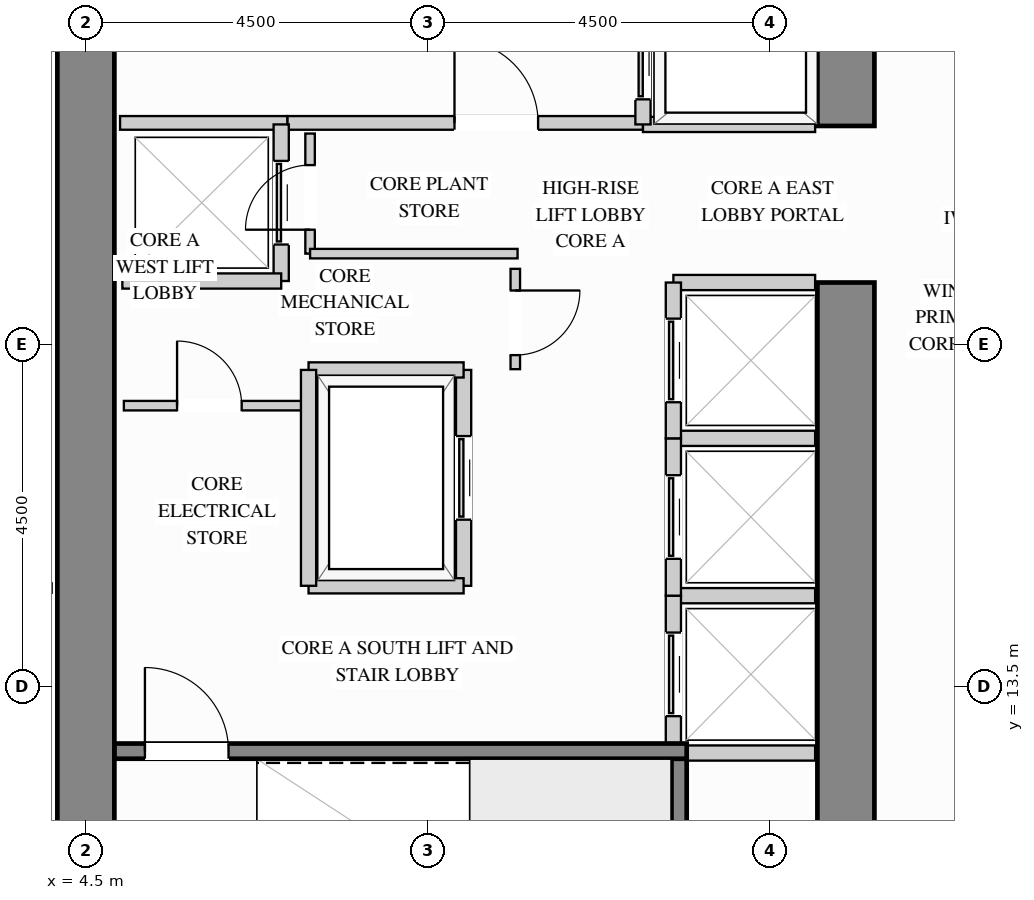
"""IFC4 building model, lengths in metres.
Left out: names, types, materials, properties, quantities, classifications, styles, units other than length and angle.
Written with IfcOpenShell. Run it as: python <this file> out.ifc"""

import sys

from ifc_helpers import new_model, si_unit, direction, frame, frame_2d, origin, place, context, subcontext, project, spatial, rectangle, extrude, source, transform, mapped, element, fill, save


model = new_model("IFC4")
c1 = context("Model", 3, precision=1e-05, world=origin(), true_north=direction((0.0, 1.0)))
c2 = subcontext(c1, "Body", "Model", "MODEL_VIEW")
j1 = project(units=[si_unit("LENGTHUNIT", "METRE"), si_unit("PLANEANGLEUNIT", "RADIAN")], contexts=[c1])
p1 = place(None, origin())
s1 = spatial("IfcSite", under=j1, at=p1, CompositionType="ELEMENT")
p2 = place(p1, origin())
s2 = spatial("IfcBuilding", under=s1, at=p2, CompositionType="ELEMENT")
p3 = place(p2, frame((0.0, 0.0, 120.6)))
s3 = spatial("IfcBuildingStorey", under=s2, at=p3, CompositionType="ELEMENT", Elevation=120.6)
m1 = source(origin(), c2, "Body", "SweptSolid", [
    extrude(rectangle(XDim=9.945, YDim=0.75, at=frame_2d((4.973, 0.0))), origin(), (0.0, 0.0, 1.0), 3.38),
])
p4 = place(p3, frame((14.5, 8.875, 0.0), z_axis=(0.0, 0.0, 1.0), x_axis=(0.0, 1.0, 0.0)))
e1 = element("IfcWall", 1, at=p4, inside=s3, PredefinedType="SHEAR", context=c2, shape_type="MappedRepresentation", body=[
    mapped(m1, transform((0.0, 0.0, 0.0), x_axis=(1.0, 0.0, 0.0), y_axis=(0.0, 1.0, 0.0), z_axis=(0.0, 0.0, 1.0))),
])
m2 = source(origin(), c2, "Body", "SweptSolid", [
    extrude(rectangle(XDim=8.245, YDim=0.75, at=frame_2d((4.123, 0.0))), origin(), (0.0, 0.0, 1.0), 3.38),
])
p5 = place(p3, frame((14.5, 20.88, 0.0), z_axis=(0.0, 0.0, 1.0), x_axis=(0.0, 1.0, 0.0)))
e2 = element("IfcWall", 2, at=p5, inside=s3, PredefinedType="SHEAR", context=c2, shape_type="MappedRepresentation", body=[
    mapped(m2, transform((0.0, 0.0, 0.0), x_axis=(1.0, 0.0, 0.0), y_axis=(0.0, 1.0, 0.0), z_axis=(0.0, 0.0, 1.0))),
])
m3 = source(origin(), c2, "Body", "SweptSolid", [
    extrude(rectangle(XDim=20.25, YDim=0.75, at=frame_2d((10.125, 0.0))), origin(), (0.0, 0.0, 1.0), 3.38),
])
p6 = place(p3, frame((4.5, 8.875, 0.0), z_axis=(0.0, 0.0, 1.0), x_axis=(0.0, 1.0, 0.0)))
e3 = element("IfcWall", 3, at=p6, inside=s3, PredefinedType="SHEAR", context=c2, shape_type="MappedRepresentation", body=[
    mapped(m3, transform((0.0, 0.0, 0.0), x_axis=(1.0, 0.0, 0.0), y_axis=(0.0, 1.0, 0.0), z_axis=(0.0, 0.0, 1.0))),
])
p7 = place(p3, frame((7.15, 20.92, 0.0), z_axis=(0.0, 0.0, 1.0), x_axis=(1.0, 0.0, 0.0)))
e4 = element("IfcWall", 4, at=p7, inside=s3, PredefinedType="PARTITIONING", context=c2, shape_type="SweptSolid", body=[
    extrude(rectangle(XDim=4.68, YDim=0.18, at=frame_2d((2.34, 0.0))), origin(), (0.0, 0.0, 1.0), 3.365),
])
p8 = place(p7, frame((2.2, 0.0, 0.0)))
e5 = element("IfcOpeningElement", 5, at=p8, cuts=e4, PredefinedType="OPENING", context=c2, shape_type="SweptSolid", body=[
    extrude(rectangle(XDim=1.1, YDim=2.15, at=frame_2d((0.55, 1.075))), frame((0.0, 0.1, 0.0), z_axis=(0.0, -1.0, 0.0), x_axis=(1.0, 0.0, 0.0)), (0.0, 0.0, 1.0), 0.2),
])
m4 = source(origin(), c2, "Body", "SweptSolid", [
    extrude(rectangle(XDim=2.2, YDim=0.18, at=frame_2d((1.1, 0.0))), origin(), (0.0, 0.0, 1.0), 3.365),
])
p9 = place(p3, frame((4.95, 20.92, 0.0), z_axis=(0.0, 0.0, 1.0), x_axis=(1.0, 0.0, 0.0)))
e6 = element("IfcWall", 6, at=p9, inside=s3, PredefinedType="PARTITIONING", context=c2, shape_type="MappedRepresentation", body=[
    mapped(m4, transform((0.0, 0.0, 0.0), x_axis=(1.0, 0.0, 0.0), y_axis=(0.0, 1.0, 0.0), z_axis=(0.0, 0.0, 1.0))),
])
p10 = place(p3, frame((10.15, 17.68, 0.0), z_axis=(0.0, 0.0, 1.0), x_axis=(0.0, 1.0, 0.0)))
e7 = element("IfcWall", 7, at=p10, inside=s3, PredefinedType="PARTITIONING", context=c2, shape_type="SweptSolid", body=[
    extrude(rectangle(XDim=1.32, YDim=0.125, at=frame_2d((0.66, 0.0))), origin(), (0.0, 0.0, 1.0), 3.365),
])
p11 = place(p10, frame((0.185, 0.0, 0.0)))
e8 = element("IfcOpeningElement", 8, at=p11, cuts=e7, PredefinedType="OPENING", context=c2, shape_type="SweptSolid", body=[
    extrude(rectangle(XDim=0.85, YDim=2.1, at=frame_2d((0.425, 1.05))), frame((0.0, 0.073, 0.0), z_axis=(0.0, -1.0, 0.0), x_axis=(1.0, 0.0, 0.0)), (0.0, 0.0, 1.0), 0.145),
])
p12 = place(p3, frame((7.45, 19.2, 0.0), z_axis=(0.0, 0.0, 1.0), x_axis=(0.0, 1.0, 0.0)))
e9 = element("IfcWall", 9, at=p12, inside=s3, PredefinedType="PARTITIONING", context=c2, shape_type="SweptSolid", body=[
    extrude(rectangle(XDim=1.58, YDim=0.125, at=frame_2d((0.79, 0.0))), origin(), (0.0, 0.0, 1.0), 3.365),
])
p13 = place(p12, frame((0.315, 0.0, 0.0)))
e10 = element("IfcOpeningElement", 10, at=p13, cuts=e9, PredefinedType="OPENING", context=c2, shape_type="SweptSolid", body=[
    extrude(rectangle(XDim=0.85, YDim=2.1, at=frame_2d((0.425, 1.05))), frame((0.0, 0.073, 0.0), z_axis=(0.0, -1.0, 0.0), x_axis=(1.0, 0.0, 0.0)), (0.0, 0.0, 1.0), 0.145),
])
m5 = source(origin(), c2, "Body", "SweptSolid", [
    extrude(rectangle(XDim=2.73, YDim=0.125, at=frame_2d((1.365, 0.0))), origin(), (0.0, 0.0, 1.0), 3.365),
])
p14 = place(p3, frame((7.45, 19.2, 0.0), z_axis=(0.0, 0.0, 1.0), x_axis=(1.0, 0.0, 0.0)))
e11 = element("IfcWall", 11, at=p14, inside=s3, PredefinedType="PARTITIONING", context=c2, shape_type="MappedRepresentation", body=[
    mapped(m5, transform((0.0, 0.0, 0.0), x_axis=(1.0, 0.0, 0.0), y_axis=(0.0, 1.0, 0.0), z_axis=(0.0, 0.0, 1.0))),
])
p15 = place(p3, frame((5.0, 17.2, 0.0), z_axis=(0.0, 0.0, 1.0), x_axis=(1.0, 0.0, 0.0)))
e12 = element("IfcWall", 12, at=p15, inside=s3, PredefinedType="PARTITIONING", context=c2, shape_type="SweptSolid", body=[
    extrude(rectangle(XDim=2.4, YDim=0.125, at=frame_2d((1.2, 0.0))), origin(), (0.0, 0.0, 1.0), 3.365),
])
p16 = place(p15, frame((0.7, 0.0, 0.0)))
e13 = element("IfcOpeningElement", 13, at=p16, cuts=e12, PredefinedType="OPENING", context=c2, shape_type="SweptSolid", body=[
    extrude(rectangle(XDim=0.85, YDim=2.1, at=frame_2d((0.425, 1.05))), frame((0.0, 0.073, 0.0), z_axis=(0.0, -1.0, 0.0), x_axis=(1.0, 0.0, 0.0)), (0.0, 0.0, 1.0), 0.145),
])
m6 = source(origin(), c2, "Body", "SweptSolid", [
    extrude(rectangle(XDim=3.698, YDim=0.125, at=frame_2d((1.849, 0.0))), origin(), (0.0, 0.0, 1.0), 3.365),
])
p17 = place(p3, frame((0.352, 14.8, 0.0), z_axis=(0.0, 0.0, 1.0), x_axis=(1.0, 0.0, 0.0)))
e14 = element("IfcWall", 14, at=p17, inside=s3, PredefinedType="PARTITIONING", context=c2, shape_type="MappedRepresentation", body=[
    mapped(m6, transform((0.0, 0.0, 0.0), x_axis=(1.0, 0.0, 0.0), y_axis=(0.0, 1.0, 0.0), z_axis=(0.0, 0.0, 1.0))),
])
m7 = source(origin(), c2, "Body", "SweptSolid", [
    extrude(rectangle(XDim=2.265, YDim=0.2, at=frame_2d((1.132, 0.0))), origin(), (0.0, 0.0, 1.0), 3.365),
])
p18 = place(p3, frame((11.83, 20.9, 0.0), z_axis=(0.0, 0.0, 1.0), x_axis=(1.0, 0.0, 0.0)))
e15 = element("IfcWall", 15, at=p18, inside=s3, PredefinedType="PARTITIONING", context=c2, shape_type="MappedRepresentation", body=[
    mapped(m7, transform((0.0, 0.0, 0.0), x_axis=(1.0, 0.0, 0.0), y_axis=(0.0, 1.0, 0.0), z_axis=(0.0, 0.0, 1.0))),
])
p19 = place(p3, frame((11.83, 20.9, 0.0), z_axis=(0.0, 0.0, 1.0), x_axis=(0.0, 1.0, 0.0)))
e16 = element("IfcWall", 16, at=p19, inside=s3, PredefinedType="PARTITIONING", context=c2, shape_type="SweptSolid", body=[
    extrude(rectangle(XDim=1.76, YDim=0.2, at=frame_2d((0.88, 0.0))), origin(), (0.0, 0.0, 1.0), 3.365),
])
p20 = place(p19, frame((0.33, 0.0, 0.0)))
e17 = element("IfcOpeningElement", 17, at=p20, cuts=e16, PredefinedType="OPENING", context=c2, shape_type="SweptSolid", body=[
    extrude(rectangle(XDim=1.1, YDim=2.2, at=frame_2d((0.55, 1.1))), frame((0.0, 0.11, 0.0), z_axis=(0.0, -1.0, 0.0), x_axis=(1.0, 0.0, 0.0)), (0.0, 0.0, 1.0), 0.22),
])
m8 = source(origin(), c2, "Body", "SweptSolid", [
    extrude(rectangle(XDim=1.865, YDim=0.2, at=frame_2d((0.933, 0.0))), origin(), (0.0, 0.0, 1.0), 3.365),
])
for number, where, z_axis, x_axis in (
    (18, (12.23, 14.7, 0.0), (0.0, 0.0, 1.0), (1.0, 0.0, 0.0)),
    (19, (12.23, 12.63, 0.0), (0.0, 0.0, 1.0), (1.0, 0.0, 0.0)),
):
    element("IfcWall", number, at=place(p3, frame(where, z_axis=z_axis, x_axis=x_axis)), inside=s3, PredefinedType="PARTITIONING", context=c2, shape_type="MappedRepresentation", body=[
        mapped(m8, transform((0.0, 0.0, 0.0), x_axis=(1.0, 0.0, 0.0), y_axis=(0.0, 1.0, 0.0), z_axis=(0.0, 0.0, 1.0))),
    ])
p21 = place(p3, frame((12.23, 12.63, 0.0), z_axis=(0.0, 0.0, 1.0), x_axis=(0.0, 1.0, 0.0)))
e20 = element("IfcWall", 20, at=p21, inside=s3, PredefinedType="PARTITIONING", context=c2, shape_type="SweptSolid", body=[
    extrude(rectangle(XDim=2.07, YDim=0.2, at=frame_2d((1.035, 0.0))), origin(), (0.0, 0.0, 1.0), 3.365),
])
p22 = place(p21, frame((0.485, 0.0, 0.0)))
e21 = element("IfcOpeningElement", 21, at=p22, cuts=e20, PredefinedType="OPENING", context=c2, shape_type="SweptSolid", body=[
    extrude(rectangle(XDim=1.1, YDim=2.2, at=frame_2d((0.55, 1.1))), frame((0.0, 0.11, 0.0), z_axis=(0.0, -1.0, 0.0), x_axis=(1.0, 0.0, 0.0)), (0.0, 0.0, 1.0), 0.22),
])
p23 = place(p3, frame((12.23, 16.77, 0.0), z_axis=(0.0, 0.0, 1.0), x_axis=(1.0, 0.0, 0.0)))
e22 = element("IfcWall", 22, at=p23, inside=s3, PredefinedType="PARTITIONING", context=c2, shape_type="MappedRepresentation", body=[
    mapped(m8, transform((0.0, 0.0, 0.0), x_axis=(1.0, 0.0, 0.0), y_axis=(0.0, 1.0, 0.0), z_axis=(0.0, 0.0, 1.0))),
])
p24 = place(p3, frame((12.23, 14.7, 0.0), z_axis=(0.0, 0.0, 1.0), x_axis=(0.0, 1.0, 0.0)))
e23 = element("IfcWall", 23, at=p24, inside=s3, PredefinedType="PARTITIONING", context=c2, shape_type="SweptSolid", body=[
    extrude(rectangle(XDim=2.07, YDim=0.2, at=frame_2d((1.035, 0.0))), origin(), (0.0, 0.0, 1.0), 3.365),
])
p25 = place(p24, frame((0.485, 0.0, 0.0)))
e24 = element("IfcOpeningElement", 24, at=p25, cuts=e23, PredefinedType="OPENING", context=c2, shape_type="SweptSolid", body=[
    extrude(rectangle(XDim=1.1, YDim=2.2, at=frame_2d((0.55, 1.1))), frame((0.0, 0.11, 0.0), z_axis=(0.0, -1.0, 0.0), x_axis=(1.0, 0.0, 0.0)), (0.0, 0.0, 1.0), 0.22),
])
p26 = place(p3, frame((12.23, 18.82, 0.0), z_axis=(0.0, 0.0, 1.0), x_axis=(1.0, 0.0, 0.0)))
e25 = element("IfcWall", 25, at=p26, inside=s3, PredefinedType="PARTITIONING", context=c2, shape_type="MappedRepresentation", body=[
    mapped(m8, transform((0.0, 0.0, 0.0), x_axis=(1.0, 0.0, 0.0), y_axis=(0.0, 1.0, 0.0), z_axis=(0.0, 0.0, 1.0))),
])
p27 = place(p3, frame((12.23, 16.77, 0.0), z_axis=(0.0, 0.0, 1.0), x_axis=(0.0, 1.0, 0.0)))
e26 = element("IfcWall", 26, at=p27, inside=s3, PredefinedType="PARTITIONING", context=c2, shape_type="SweptSolid", body=[
    extrude(rectangle(XDim=2.05, YDim=0.2, at=frame_2d((1.025, 0.0))), origin(), (0.0, 0.0, 1.0), 3.365),
])
p28 = place(p27, frame((0.475, 0.0, 0.0)))
e27 = element("IfcOpeningElement", 27, at=p28, cuts=e26, PredefinedType="OPENING", context=c2, shape_type="SweptSolid", body=[
    extrude(rectangle(XDim=1.1, YDim=2.2, at=frame_2d((0.55, 1.1))), frame((0.0, 0.11, 0.0), z_axis=(0.0, -1.0, 0.0), x_axis=(1.0, 0.0, 0.0)), (0.0, 0.0, 1.0), 0.22),
])
p29 = place(p3, frame((7.07, 18.84, 0.0), z_axis=(0.0, 0.0, 1.0), x_axis=(0.0, 1.0, 0.0)))
e28 = element("IfcWall", 28, at=p29, inside=s3, PredefinedType="PARTITIONING", context=c2, shape_type="SweptSolid", body=[
    extrude(rectangle(XDim=2.06, YDim=0.2, at=frame_2d((1.03, 0.0))), origin(), (0.0, 0.0, 1.0), 3.365),
])
p30 = place(p29, frame((0.48, 0.0, 0.0)))
e29 = element("IfcOpeningElement", 29, at=p30, cuts=e28, PredefinedType="OPENING", context=c2, shape_type="SweptSolid", body=[
    extrude(rectangle(XDim=1.1, YDim=2.2, at=frame_2d((0.55, 1.1))), frame((0.0, 0.11, 0.0), z_axis=(0.0, -1.0, 0.0), x_axis=(1.0, 0.0, 0.0)), (0.0, 0.0, 1.0), 0.22),
])
m9 = source(origin(), c2, "Body", "SweptSolid", [
    extrude(rectangle(XDim=2.09, YDim=0.2, at=frame_2d((1.045, 0.0))), origin(), (0.0, 0.0, 1.0), 3.365),
])
p31 = place(p3, frame((4.98, 18.84, 0.0), z_axis=(0.0, 0.0, 1.0), x_axis=(1.0, 0.0, 0.0)))
e30 = element("IfcWall", 30, at=p31, inside=s3, PredefinedType="PARTITIONING", context=c2, shape_type="MappedRepresentation", body=[
    mapped(m9, transform((0.0, 0.0, 0.0), x_axis=(1.0, 0.0, 0.0), y_axis=(0.0, 1.0, 0.0), z_axis=(0.0, 0.0, 1.0))),
])
p32 = place(p3, frame((9.47, 14.83, 0.0), z_axis=(0.0, 0.0, 1.0), x_axis=(0.0, 1.0, 0.0)))
e31 = element("IfcWall", 31, at=p32, inside=s3, PredefinedType="PARTITIONING", context=c2, shape_type="SweptSolid", body=[
    extrude(rectangle(XDim=2.84, YDim=0.2, at=frame_2d((1.42, 0.0))), origin(), (0.0, 0.0, 1.0), 3.365),
])
p33 = place(p32, frame((0.87, 0.0, 0.0)))
e32 = element("IfcOpeningElement", 32, at=p33, cuts=e31, PredefinedType="OPENING", context=c2, shape_type="SweptSolid", body=[
    extrude(rectangle(XDim=1.1, YDim=2.2, at=frame_2d((0.55, 1.1))), frame((0.0, 0.11, 0.0), z_axis=(0.0, -1.0, 0.0), x_axis=(1.0, 0.0, 0.0)), (0.0, 0.0, 1.0), 0.22),
])
m10 = source(origin(), c2, "Body", "SweptSolid", [
    extrude(rectangle(XDim=2.04, YDim=0.2, at=frame_2d((1.02, 0.0))), origin(), (0.0, 0.0, 1.0), 3.365),
])
for number, where, z_axis, x_axis in (
    (33, (7.43, 17.67, 0.0), (0.0, 0.0, 1.0), (1.0, 0.0, 0.0)),
    (34, (7.43, 14.83, 0.0), (0.0, 0.0, 1.0), (1.0, 0.0, 0.0)),
):
    element("IfcWall", number, at=place(p3, frame(where, z_axis=z_axis, x_axis=x_axis)), inside=s3, PredefinedType="PARTITIONING", context=c2, shape_type="MappedRepresentation", body=[
        mapped(m10, transform((0.0, 0.0, 0.0), x_axis=(1.0, 0.0, 0.0), y_axis=(0.0, 1.0, 0.0), z_axis=(0.0, 0.0, 1.0))),
    ])
m11 = source(origin(), c2, "Body", "SweptSolid", [
    extrude(rectangle(XDim=2.84, YDim=0.2, at=frame_2d((1.42, 0.0))), origin(), (0.0, 0.0, 1.0), 3.365),
])
p34 = place(p3, frame((7.43, 14.83, 0.0), z_axis=(0.0, 0.0, 1.0), x_axis=(0.0, 1.0, 0.0)))
e35 = element("IfcWall", 35, at=p34, inside=s3, PredefinedType="PARTITIONING", context=c2, shape_type="MappedRepresentation", body=[
    mapped(m11, transform((0.0, 0.0, 0.0), x_axis=(1.0, 0.0, 0.0), y_axis=(0.0, 1.0, 0.0), z_axis=(0.0, 0.0, 1.0))),
])
m12 = source(origin(), c2, "Body", "SweptSolid", [
    extrude(rectangle(XDim=3.678, YDim=0.2, at=frame_2d((1.839, 0.0))), origin(), (0.0, 0.0, 1.0), 3.38),
])
p35 = place(p3, frame((12.305, 8.877, 0.0), z_axis=(0.0, 0.0, 1.0), x_axis=(0.0, 1.0, 0.0)))
e36 = element("IfcWall", 36, at=p35, inside=s3, PredefinedType="SHEAR", context=c2, shape_type="MappedRepresentation", body=[
    mapped(m12, transform((0.0, 0.0, 0.0), x_axis=(1.0, 0.0, 0.0), y_axis=(0.0, 1.0, 0.0), z_axis=(0.0, 0.0, 1.0))),
])
p36 = place(p3, frame((4.877, 12.655, 0.0), z_axis=(0.0, 0.0, 1.0), x_axis=(1.0, 0.0, 0.0)))
e37 = element("IfcWall", 37, at=p36, inside=s3, PredefinedType="SHEAR", context=c2, shape_type="SweptSolid", body=[
    extrude(rectangle(XDim=7.528, YDim=0.2, at=frame_2d((3.764, 0.0))), origin(), (0.0, 0.0, 1.0), 3.38),
])
p37 = place(p36, frame((0.4, 0.0, 0.0)))
e38 = element("IfcOpeningElement", 38, at=p37, cuts=e37, PredefinedType="OPENING", context=c2, shape_type="SweptSolid", body=[
    extrude(rectangle(XDim=1.1, YDim=2.15, at=frame_2d((0.55, 1.075))), frame((0.0, 0.11, 0.0), z_axis=(0.0, -1.0, 0.0), x_axis=(1.0, 0.0, 0.0)), (0.0, 0.0, 1.0), 0.22),
])
m13 = source(origin(), c2, "Body", "SweptSolid", [
    extrude(rectangle(XDim=1.1, YDim=2.15, at=frame_2d((0.55, 1.075))), frame((0.0, 0.025, 0.0), z_axis=(0.0, -1.0, 0.0), x_axis=(1.0, 0.0, 0.0)), (0.0, 0.0, 1.0), 0.05),
])
p38 = place(p8, origin())
e39 = element("IfcDoor", 39, at=p38, inside=s3, OperationType="SINGLE_SWING_LEFT", PredefinedType="DOOR", context=c2, shape_type="MappedRepresentation", body=[
    mapped(m13, transform((0.0, 0.0, 0.0), x_axis=(1.0, 0.0, 0.0), y_axis=(0.0, 1.0, 0.0), z_axis=(0.0, 0.0, 1.0))),
])
fill(e5, e39)
m14 = source(origin(), c2, "Body", "SweptSolid", [
    extrude(rectangle(XDim=1.1, YDim=2.2, at=frame_2d((0.55, 1.1))), frame((0.0, 0.025, 0.0), z_axis=(0.0, -1.0, 0.0), x_axis=(1.0, 0.0, 0.0)), (0.0, 0.0, 1.0), 0.05),
])
p39 = place(p20, origin())
e40 = element("IfcDoor", 40, at=p39, inside=s3, OperationType="SLIDING_TO_LEFT", PredefinedType="DOOR", context=c2, shape_type="MappedRepresentation", body=[
    mapped(m14, transform((0.0, 0.0, 0.0), x_axis=(1.0, 0.0, 0.0), y_axis=(0.0, 1.0, 0.0), z_axis=(0.0, 0.0, 1.0))),
])
fill(e17, e40)
p40 = place(p22, origin())
e41 = element("IfcDoor", 41, at=p40, inside=s3, OperationType="SLIDING_TO_LEFT", PredefinedType="DOOR", context=c2, shape_type="MappedRepresentation", body=[
    mapped(m14, transform((0.0, 0.0, 0.0), x_axis=(1.0, 0.0, 0.0), y_axis=(0.0, 1.0, 0.0), z_axis=(0.0, 0.0, 1.0))),
])
fill(e21, e41)
p41 = place(p25, origin())
e42 = element("IfcDoor", 42, at=p41, inside=s3, OperationType="SLIDING_TO_LEFT", PredefinedType="DOOR", context=c2, shape_type="MappedRepresentation", body=[
    mapped(m14, transform((0.0, 0.0, 0.0), x_axis=(1.0, 0.0, 0.0), y_axis=(0.0, 1.0, 0.0), z_axis=(0.0, 0.0, 1.0))),
])
fill(e24, e42)
p42 = place(p28, origin())
e43 = element("IfcDoor", 43, at=p42, inside=s3, OperationType="SLIDING_TO_LEFT", PredefinedType="DOOR", context=c2, shape_type="MappedRepresentation", body=[
    mapped(m14, transform((0.0, 0.0, 0.0), x_axis=(1.0, 0.0, 0.0), y_axis=(0.0, 1.0, 0.0), z_axis=(0.0, 0.0, 1.0))),
])
fill(e27, e43)
p43 = place(p30, origin())
e44 = element("IfcDoor", 44, at=p43, inside=s3, OperationType="SLIDING_TO_LEFT", PredefinedType="DOOR", context=c2, shape_type="MappedRepresentation", body=[
    mapped(m14, transform((0.0, 0.0, 0.0), x_axis=(1.0, 0.0, 0.0), y_axis=(0.0, 1.0, 0.0), z_axis=(0.0, 0.0, 1.0))),
])
fill(e29, e44)
p44 = place(p33, origin())
e45 = element("IfcDoor", 45, at=p44, inside=s3, OperationType="SLIDING_TO_LEFT", PredefinedType="DOOR", context=c2, shape_type="MappedRepresentation", body=[
    mapped(m14, transform((0.0, 0.0, 0.0), x_axis=(1.0, 0.0, 0.0), y_axis=(0.0, 1.0, 0.0), z_axis=(0.0, 0.0, 1.0))),
])
fill(e32, e45)
m15 = source(origin(), c2, "Body", "SweptSolid", [
    extrude(rectangle(XDim=0.85, YDim=2.1, at=frame_2d((0.425, 1.05))), frame((0.0, 0.025, 0.0), z_axis=(0.0, -1.0, 0.0), x_axis=(1.0, 0.0, 0.0)), (0.0, 0.0, 1.0), 0.05),
])
p45 = place(p11, origin())
e46 = element("IfcDoor", 46, at=p45, inside=s3, OperationType="SINGLE_SWING_RIGHT", PredefinedType="DOOR", context=c2, shape_type="MappedRepresentation", body=[
    mapped(m15, transform((0.0, 0.0, 0.0), x_axis=(1.0, 0.0, 0.0), y_axis=(0.0, 1.0, 0.0), z_axis=(0.0, 0.0, 1.0))),
])
fill(e8, e46)
p46 = place(p16, origin())
e47 = element("IfcDoor", 47, at=p46, inside=s3, OperationType="SINGLE_SWING_LEFT", PredefinedType="DOOR", context=c2, shape_type="MappedRepresentation", body=[
    mapped(m15, transform((0.0, 0.0, 0.0), x_axis=(1.0, 0.0, 0.0), y_axis=(0.0, 1.0, 0.0), z_axis=(0.0, 0.0, 1.0))),
])
fill(e13, e47)
p47 = place(p13, origin())
e48 = element("IfcDoor", 48, at=p47, inside=s3, OperationType="SINGLE_SWING_LEFT", PredefinedType="DOOR", context=c2, shape_type="MappedRepresentation", body=[
    mapped(m15, transform((0.0, 0.0, 0.0), x_axis=(1.0, 0.0, 0.0), y_axis=(0.0, 1.0, 0.0), z_axis=(0.0, 0.0, 1.0))),
])
fill(e10, e48)
m16 = source(origin(), c2, "Body", "SweptSolid", [
    extrude(rectangle(XDim=1.1, YDim=2.15, at=frame_2d((0.55, 1.075))), frame((0.0, 0.025, 0.0), z_axis=(0.0, -1.0, 0.0), x_axis=(1.0, 0.0, 0.0)), (0.0, 0.0, 1.0), 0.05),
])
p48 = place(p37, origin())
e49 = element("IfcDoor", 49, at=p48, inside=s3, OperationType="SINGLE_SWING_LEFT", PredefinedType="DOOR", context=c2, shape_type="MappedRepresentation", body=[
    mapped(m16, transform((0.0, 0.0, 0.0), x_axis=(1.0, 0.0, 0.0), y_axis=(0.0, 1.0, 0.0), z_axis=(0.0, 0.0, 1.0))),
])
fill(e38, e49)
save(model, sys.argv[1])
